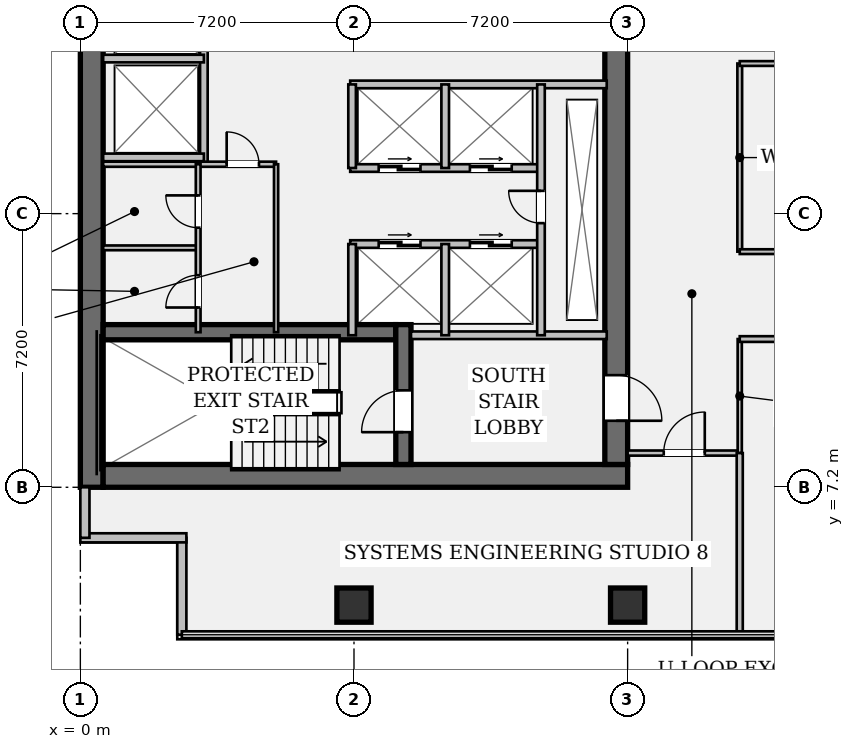
"""IFC4 building model, lengths in metres.
Left out: names, types, materials, properties, quantities, classifications, styles, units other than length and angle.
Written with IfcOpenShell. Run it as: python <this file> out.ifc"""

import sys

from ifc_helpers import new_model, si_unit, direction, frame, frame_2d, origin, origin_2d, place, context, subcontext, project, spatial, rectangle, hollow_rectangle, extrude, element, fill, save


model = new_model("IFC4")
c1 = context("Model", 3, precision=1e-05, world=origin(), true_north=direction((0.0, 1.0)))
c2 = subcontext(c1, "Body", "Model", "MODEL_VIEW")
j1 = project(units=[si_unit("LENGTHUNIT", "METRE"), si_unit("PLANEANGLEUNIT", "RADIAN")], contexts=[c1])
p1 = place(None, origin())
s1 = spatial("IfcSite", under=j1, at=p1, CompositionType="ELEMENT")
p2 = place(p1, origin())
s2 = spatial("IfcBuilding", under=s1, at=p2, CompositionType="ELEMENT")
p3 = place(p2, frame((0.0, 0.0, 133.0)))
s3 = spatial("IfcBuildingStorey", under=s2, at=p3, CompositionType="ELEMENT", Elevation=133.0)
p4 = place(p3, frame((0.3, 7.2, 0.0), z_axis=(0.0, 0.0, 1.0), x_axis=(0.0, 1.0, 0.0)))
e1 = element("IfcWall", 1, at=p4, inside=s3, PredefinedType="SHEAR", context=c2, shape_type="SweptSolid", body=[
    extrude(rectangle(XDim=28.8, YDim=0.6, at=frame_2d((14.4, 0.0))), origin(), (0.0, 0.0, 1.0), 3.58),
])
p5 = place(p3, frame((0.6, 7.5, 0.0), z_axis=(0.0, 0.0, 1.0), x_axis=(1.0, 0.0, 0.0)))
e2 = element("IfcWall", 2, at=p5, inside=s3, PredefinedType="SHEAR", context=c2, shape_type="SweptSolid", body=[
    extrude(rectangle(XDim=13.8, YDim=0.6, at=frame_2d((6.9, 0.0))), origin(), (0.0, 0.0, 1.0), 3.58),
])
p6 = place(p3, frame((14.1, 35.4, 0.0), z_axis=(0.0, 0.0, 1.0), x_axis=(0.0, -1.0, 0.0)))
e3 = element("IfcWall", 3, at=p6, inside=s3, PredefinedType="SHEAR", context=c2, shape_type="SweptSolid", body=[
    extrude(rectangle(XDim=27.6, YDim=0.6, at=frame_2d((13.8, 0.0))), origin(), (0.0, 0.0, 1.0), 3.58),
])
p7 = place(p6, frame((1.3, 0.0, 0.0)))
e4 = element("IfcOpeningElement", 4, at=p7, cuts=e3, PredefinedType="OPENING", context=c2, shape_type="SweptSolid", body=[
    extrude(rectangle(XDim=1.2, YDim=2.15, at=frame_2d((0.6, 1.075))), frame((0.0, 0.312, 0.0), z_axis=(0.0, -1.0, 0.0), x_axis=(1.0, 0.0, 0.0)), (0.0, 0.0, 1.0), 0.624),
])
p8 = place(p6, frame((25.25, 0.0, 0.0)))
e5 = element("IfcOpeningElement", 5, at=p8, cuts=e3, PredefinedType="OPENING", context=c2, shape_type="SweptSolid", body=[
    extrude(rectangle(XDim=1.2, YDim=2.15, at=frame_2d((0.6, 1.075))), frame((0.0, 0.312, 0.0), z_axis=(0.0, -1.0, 0.0), x_axis=(1.0, 0.0, 0.0)), (0.0, 0.0, 1.0), 0.624),
])
p9 = place(p6, frame((14.6, 0.0, 0.0)))
e6 = element("IfcOpeningElement", 6, at=p9, cuts=e3, PredefinedType="OPENING", context=c2, shape_type="SweptSolid", body=[
    extrude(rectangle(XDim=1.6, YDim=2.2, at=frame_2d((0.8, 1.1))), frame((0.0, 0.312, 0.0), z_axis=(0.0, -1.0, 0.0), x_axis=(1.0, 0.0, 0.0)), (0.0, 0.0, 1.0), 0.624),
])
p10 = place(p3, frame((0.6, 11.28, 0.0), z_axis=(0.0, 0.0, 1.0), x_axis=(1.0, 0.0, 0.0)))
e7 = element("IfcWall", 7, at=p10, inside=s3, PredefinedType="SHEAR", context=c2, shape_type="SweptSolid", body=[
    extrude(rectangle(XDim=7.7, YDim=0.4, at=frame_2d((3.85, 0.0))), origin(), (0.0, 0.0, 1.0), 3.58),
])
p11 = place(p3, frame((8.5, 7.8, 0.0), z_axis=(0.0, 0.0, 1.0), x_axis=(0.0, 1.0, 0.0)))
e8 = element("IfcWall", 8, at=p11, inside=s3, PredefinedType="SHEAR", context=c2, shape_type="SweptSolid", body=[
    extrude(rectangle(XDim=3.68, YDim=0.4, at=frame_2d((1.84, 0.0))), origin(), (0.0, 0.0, 1.0), 3.58),
])
p12 = place(p11, frame((0.85, 0.0, 0.0)))
e9 = element("IfcOpeningElement", 9, at=p12, cuts=e8, PredefinedType="OPENING", context=c2, shape_type="SweptSolid", body=[
    extrude(rectangle(XDim=1.1, YDim=2.15, at=frame_2d((0.55, 1.075))), frame((0.0, 0.212, 0.0), z_axis=(0.0, -1.0, 0.0), x_axis=(1.0, 0.0, 0.0)), (0.0, 0.0, 1.0), 0.424),
])
for number, where, z_axis, x_axis in (
    (10, (7.2, 4.1, 0.0), (0.0, 0.0, 1.0), (1.0, 0.0, 0.0)),
    (11, (14.4, 4.1, 0.0), (0.0, 0.0, 1.0), (1.0, 0.0, 0.0)),
):
    element("IfcColumn", number, at=place(p3, frame(where, z_axis=z_axis, x_axis=x_axis)), inside=s3, PredefinedType="COLUMN", context=c2, shape_type="SweptSolid", body=[
        extrude(hollow_rectangle(XDim=0.9, YDim=0.9, WallThickness=0.055, at=origin_2d()), origin(), (0.0, 0.0, 1.0), 3.58),
    ])
p13 = place(p3, frame((2.67, 3.32, 0.0), z_axis=(0.0, 0.0, 1.0), x_axis=(0.0, 1.0, 0.0)))
e12 = element("IfcWall", 12, at=p13, inside=s3, PredefinedType="STANDARD", context=c2, shape_type="SweptSolid", body=[
    extrude(rectangle(XDim=2.55, YDim=0.24, at=frame_2d((1.275, 0.0))), origin(), (0.0, 0.0, 1.0), 3.58),
])
p14 = place(p3, frame((2.79, 5.87, 0.0), z_axis=(0.0, 0.0, 1.0), x_axis=(-1.0, 0.0, 0.0)))
e13 = element("IfcWall", 13, at=p14, inside=s3, PredefinedType="STANDARD", context=c2, shape_type="SweptSolid", body=[
    extrude(rectangle(XDim=2.79, YDim=0.24, at=frame_2d((1.395, 0.0))), origin(), (0.0, 0.0, 1.0), 3.58),
])
p15 = place(p3, frame((0.12, 5.87, 0.0), z_axis=(0.0, 0.0, 1.0), x_axis=(0.0, 1.0, 0.0)))
e14 = element("IfcWall", 14, at=p15, inside=s3, PredefinedType="STANDARD", context=c2, shape_type="SweptSolid", body=[
    extrude(rectangle(XDim=1.33, YDim=0.24, at=frame_2d((0.665, 0.0))), origin(), (0.0, 0.0, 1.0), 3.58),
])
p16 = place(p3, frame((8.7, 11.2, 0.0), z_axis=(0.0, 0.0, 1.0), x_axis=(1.0, 0.0, 0.0)))
e15 = element("IfcWall", 15, at=p16, inside=s3, PredefinedType="PARTITIONING", context=c2, shape_type="SweptSolid", body=[
    extrude(rectangle(XDim=5.15, YDim=0.2, at=frame_2d((2.575, 0.0))), origin(), (0.0, 0.0, 1.0), 3.58),
])
p17 = place(p3, frame((3.25, 15.7, 0.0), z_axis=(0.0, 0.0, 1.0), x_axis=(0.0, 1.0, 0.0)))
e16 = element("IfcWall", 16, at=p17, inside=s3, PredefinedType="PARTITIONING", context=c2, shape_type="SweptSolid", body=[
    extrude(rectangle(XDim=13.08, YDim=0.2, at=frame_2d((6.54, 0.0))), origin(), (0.0, 0.0, 1.0), 3.58),
])
for number, where, z_axis, x_axis in (
    (17, (0.6, 15.88, 0.0), (0.0, 0.0, 1.0), (1.0, 0.0, 0.0)),
    (18, (0.6, 18.48, 0.0), (0.0, 0.0, 1.0), (1.0, 0.0, 0.0)),
):
    element("IfcWall", number, at=place(p3, frame(where, z_axis=z_axis, x_axis=x_axis)), inside=s3, PredefinedType="PARTITIONING", context=c2, shape_type="SweptSolid", body=[
        extrude(rectangle(XDim=2.65, YDim=0.2, at=frame_2d((1.325, 0.0))), origin(), (0.0, 0.0, 1.0), 3.58),
    ])
p18 = place(p3, frame((7.1, 17.8, 0.0), z_axis=(0.0, 0.0, 1.0), x_axis=(1.0, 0.0, 0.0)))
e19 = element("IfcWall", 19, at=p18, inside=s3, PredefinedType="PARTITIONING", context=c2, shape_type="SweptSolid", body=[
    extrude(rectangle(XDim=6.75, YDim=0.2, at=frame_2d((3.375, 0.0))), origin(), (0.0, 0.0, 1.0), 3.58),
])
p19 = place(p3, frame((7.1, 15.6, 0.0), z_axis=(0.0, 0.0, 1.0), x_axis=(1.0, 0.0, 0.0)))
e20 = element("IfcWall", 20, at=p19, inside=s3, PredefinedType="PARTITIONING", context=c2, shape_type="SweptSolid", body=[
    extrude(rectangle(XDim=5.02, YDim=0.2, at=frame_2d((2.51, 0.0))), origin(), (0.0, 0.0, 1.0), 3.58),
])
p20 = place(p19, frame((0.75, 0.0, 0.0)))
e21 = element("IfcOpeningElement", 21, at=p20, cuts=e20, PredefinedType="OPENING", context=c2, shape_type="SweptSolid", body=[
    extrude(rectangle(XDim=1.1, YDim=2.2, at=frame_2d((0.55, 1.1))), frame((0.0, 0.112, 0.0), z_axis=(0.0, -1.0, 0.0), x_axis=(1.0, 0.0, 0.0)), (0.0, 0.0, 1.0), 0.224),
])
p21 = place(p19, frame((3.15, 0.0, 0.0)))
e22 = element("IfcOpeningElement", 22, at=p21, cuts=e20, PredefinedType="OPENING", context=c2, shape_type="SweptSolid", body=[
    extrude(rectangle(XDim=1.1, YDim=2.2, at=frame_2d((0.55, 1.1))), frame((0.0, 0.112, 0.0), z_axis=(0.0, -1.0, 0.0), x_axis=(1.0, 0.0, 0.0)), (0.0, 0.0, 1.0), 0.224),
])
p22 = place(p3, frame((7.1, 13.6, 0.0), z_axis=(0.0, 0.0, 1.0), x_axis=(1.0, 0.0, 0.0)))
e23 = element("IfcWall", 23, at=p22, inside=s3, PredefinedType="PARTITIONING", context=c2, shape_type="SweptSolid", body=[
    extrude(rectangle(XDim=5.02, YDim=0.2, at=frame_2d((2.51, 0.0))), origin(), (0.0, 0.0, 1.0), 3.58),
])
p23 = place(p22, frame((0.75, 0.0, 0.0)))
e24 = element("IfcOpeningElement", 24, at=p23, cuts=e23, PredefinedType="OPENING", context=c2, shape_type="SweptSolid", body=[
    extrude(rectangle(XDim=1.1, YDim=2.2, at=frame_2d((0.55, 1.1))), frame((0.0, 0.112, 0.0), z_axis=(0.0, -1.0, 0.0), x_axis=(1.0, 0.0, 0.0)), (0.0, 0.0, 1.0), 0.224),
])
p24 = place(p22, frame((3.15, 0.0, 0.0)))
e25 = element("IfcOpeningElement", 25, at=p24, cuts=e23, PredefinedType="OPENING", context=c2, shape_type="SweptSolid", body=[
    extrude(rectangle(XDim=1.1, YDim=2.2, at=frame_2d((0.55, 1.1))), frame((0.0, 0.112, 0.0), z_axis=(0.0, -1.0, 0.0), x_axis=(1.0, 0.0, 0.0)), (0.0, 0.0, 1.0), 0.224),
])
p25 = place(p3, frame((7.15, 15.6, 0.0), z_axis=(0.0, 0.0, 1.0), x_axis=(0.0, 1.0, 0.0)))
e26 = element("IfcWall", 26, at=p25, inside=s3, PredefinedType="PARTITIONING", context=c2, shape_type="SweptSolid", body=[
    extrude(rectangle(XDim=2.2, YDim=0.2, at=frame_2d((1.1, 0.0))), origin(), (0.0, 0.0, 1.0), 3.58),
])
p26 = place(p3, frame((7.15, 11.2, 0.0), z_axis=(0.0, 0.0, 1.0), x_axis=(0.0, 1.0, 0.0)))
e27 = element("IfcWall", 27, at=p26, inside=s3, PredefinedType="PARTITIONING", context=c2, shape_type="SweptSolid", body=[
    extrude(rectangle(XDim=2.4, YDim=0.2, at=frame_2d((1.2, 0.0))), origin(), (0.0, 0.0, 1.0), 3.58),
])
p27 = place(p3, frame((9.6, 15.6, 0.0), z_axis=(0.0, 0.0, 1.0), x_axis=(0.0, 1.0, 0.0)))
e28 = element("IfcWall", 28, at=p27, inside=s3, PredefinedType="PARTITIONING", context=c2, shape_type="SweptSolid", body=[
    extrude(rectangle(XDim=2.2, YDim=0.2, at=frame_2d((1.1, 0.0))), origin(), (0.0, 0.0, 1.0), 3.58),
])
p28 = place(p3, frame((9.6, 11.2, 0.0), z_axis=(0.0, 0.0, 1.0), x_axis=(0.0, 1.0, 0.0)))
e29 = element("IfcWall", 29, at=p28, inside=s3, PredefinedType="PARTITIONING", context=c2, shape_type="SweptSolid", body=[
    extrude(rectangle(XDim=2.4, YDim=0.2, at=frame_2d((1.2, 0.0))), origin(), (0.0, 0.0, 1.0), 3.58),
])
p29 = place(p3, frame((12.12, 11.2, 0.0), z_axis=(0.0, 0.0, 1.0), x_axis=(0.0, 1.0, 0.0)))
e30 = element("IfcWall", 30, at=p29, inside=s3, PredefinedType="PARTITIONING", context=c2, shape_type="SweptSolid", body=[
    extrude(rectangle(XDim=6.6, YDim=0.2, at=frame_2d((3.3, 0.0))), origin(), (0.0, 0.0, 1.0), 3.58),
])
p30 = place(p29, frame((2.95, 0.0, 0.0)))
e31 = element("IfcOpeningElement", 31, at=p30, cuts=e30, PredefinedType="OPENING", context=c2, shape_type="SweptSolid", body=[
    extrude(rectangle(XDim=0.85, YDim=2.15, at=frame_2d((0.425, 1.075))), frame((0.0, 0.112, 0.0), z_axis=(0.0, -1.0, 0.0), x_axis=(1.0, 0.0, 0.0)), (0.0, 0.0, 1.0), 0.224),
])
p31 = place(p3, frame((0.6, 15.7, 0.0), z_axis=(0.0, 0.0, 1.0), x_axis=(1.0, 0.0, 0.0)))
e32 = element("IfcWall", 32, at=p31, inside=s3, PredefinedType="PARTITIONING", context=c2, shape_type="SweptSolid", body=[
    extrude(rectangle(XDim=4.55, YDim=0.135, at=frame_2d((2.275, 0.0))), origin(), (0.0, 0.0, 1.0), 3.58),
])
p32 = place(p31, frame((3.25, 0.0, 0.0)))
e33 = element("IfcOpeningElement", 33, at=p32, cuts=e32, PredefinedType="OPENING", context=c2, shape_type="SweptSolid", body=[
    extrude(rectangle(XDim=0.85, YDim=2.15, at=frame_2d((0.425, 1.075))), frame((0.0, 0.08, 0.0), z_axis=(0.0, -1.0, 0.0), x_axis=(1.0, 0.0, 0.0)), (0.0, 0.0, 1.0), 0.159),
])
p33 = place(p3, frame((5.15, 11.28, 0.0), z_axis=(0.0, 0.0, 1.0), x_axis=(0.0, 1.0, 0.0)))
e34 = element("IfcWall", 34, at=p33, inside=s3, PredefinedType="PARTITIONING", context=c2, shape_type="SweptSolid", body=[
    extrude(rectangle(XDim=4.42, YDim=0.11, at=frame_2d((2.21, 0.0))), origin(), (0.0, 0.0, 1.0), 3.58),
])
p34 = place(p3, frame((0.6, 13.5, 0.0), z_axis=(0.0, 0.0, 1.0), x_axis=(1.0, 0.0, 0.0)))
e35 = element("IfcWall", 35, at=p34, inside=s3, PredefinedType="PARTITIONING", context=c2, shape_type="SweptSolid", body=[
    extrude(rectangle(XDim=2.5, YDim=0.125, at=frame_2d((1.25, 0.0))), origin(), (0.0, 0.0, 1.0), 3.58),
])
p35 = place(p3, frame((3.1, 11.28, 0.0), z_axis=(0.0, 0.0, 1.0), x_axis=(0.0, 1.0, 0.0)))
e36 = element("IfcWall", 36, at=p35, inside=s3, PredefinedType="PARTITIONING", context=c2, shape_type="SweptSolid", body=[
    extrude(rectangle(XDim=4.42, YDim=0.125, at=frame_2d((2.21, 0.0))), origin(), (0.0, 0.0, 1.0), 3.58),
])
p36 = place(p35, frame((0.65, 0.0, 0.0)))
e37 = element("IfcOpeningElement", 37, at=p36, cuts=e36, PredefinedType="OPENING", context=c2, shape_type="SweptSolid", body=[
    extrude(rectangle(XDim=0.85, YDim=2.15, at=frame_2d((0.425, 1.075))), frame((0.0, 0.074, 0.0), z_axis=(0.0, -1.0, 0.0), x_axis=(1.0, 0.0, 0.0)), (0.0, 0.0, 1.0), 0.149),
])
p37 = place(p35, frame((2.75, 0.0, 0.0)))
e38 = element("IfcOpeningElement", 38, at=p37, cuts=e36, PredefinedType="OPENING", context=c2, shape_type="SweptSolid", body=[
    extrude(rectangle(XDim=0.85, YDim=2.15, at=frame_2d((0.425, 1.075))), frame((0.0, 0.074, 0.0), z_axis=(0.0, -1.0, 0.0), x_axis=(1.0, 0.0, 0.0)), (0.0, 0.0, 1.0), 0.149),
])
p38 = place(p3, frame((14.4, 8.1, 0.0), z_axis=(0.0, 0.0, 1.0), x_axis=(1.0, 0.0, 0.0)))
e39 = element("IfcWall", 39, at=p38, inside=s3, PredefinedType="PARTITIONING", context=c2, shape_type="SweptSolid", body=[
    extrude(rectangle(XDim=2.95, YDim=0.135, at=frame_2d((1.475, 0.0))), origin(), (0.0, 0.0, 1.0), 3.148),
])
p39 = place(p38, frame((0.95, 0.0, 0.0)))
e40 = element("IfcOpeningElement", 40, at=p39, cuts=e39, PredefinedType="OPENING", context=c2, shape_type="SweptSolid", body=[
    extrude(rectangle(XDim=1.08, YDim=2.15, at=frame_2d((0.54, 1.075))), frame((0.0, 0.08, 0.0), z_axis=(0.0, -1.0, 0.0), x_axis=(1.0, 0.0, 0.0)), (0.0, 0.0, 1.0), 0.159),
])
p40 = place(p3, frame((17.35, 8.1, 0.0), z_axis=(0.0, 0.0, 1.0), x_axis=(0.0, 1.0, 0.0)))
e41 = element("IfcWall", 41, at=p40, inside=s3, PredefinedType="PARTITIONING", context=c2, shape_type="SweptSolid", body=[
    extrude(rectangle(XDim=3.0, YDim=0.11, at=frame_2d((1.5, 0.0))), origin(), (0.0, 0.0, 1.0), 3.58),
])
p41 = place(p3, frame((17.35, 11.1, 0.0), z_axis=(0.0, 0.0, 1.0), x_axis=(1.0, 0.0, 0.0)))
e42 = element("IfcWall", 42, at=p41, inside=s3, PredefinedType="PARTITIONING", context=c2, shape_type="SweptSolid", body=[
    extrude(rectangle(XDim=19.95, YDim=0.15, at=frame_2d((9.975, 0.0))), origin(), (0.0, 0.0, 1.0), 2.869),
])
p42 = place(p41, frame((2.52, 0.0, 0.0)))
e43 = element("IfcOpeningElement", 43, at=p42, cuts=e42, PredefinedType="OPENING", context=c2, shape_type="SweptSolid", body=[
    extrude(rectangle(XDim=1.08, YDim=2.15, at=frame_2d((0.54, 1.075))), frame((0.0, 0.087, 0.0), z_axis=(0.0, -1.0, 0.0), x_axis=(1.0, 0.0, 0.0)), (0.0, 0.0, 1.0), 0.174),
])
p43 = place(p41, frame((9.15, 0.0, 0.0)))
e44 = element("IfcOpeningElement", 44, at=p43, cuts=e42, PredefinedType="OPENING", context=c2, shape_type="SweptSolid", body=[
    extrude(rectangle(XDim=1.08, YDim=2.15, at=frame_2d((0.54, 1.075))), frame((0.0, 0.087, 0.0), z_axis=(0.0, -1.0, 0.0), x_axis=(1.0, 0.0, 0.0)), (0.0, 0.0, 1.0), 0.174),
])
p44 = place(p41, frame((16.1, 0.0, 0.0)))
e45 = element("IfcOpeningElement", 45, at=p44, cuts=e42, PredefinedType="OPENING", context=c2, shape_type="SweptSolid", body=[
    extrude(rectangle(XDim=1.08, YDim=2.15, at=frame_2d((0.54, 1.075))), frame((0.0, 0.087, 0.0), z_axis=(0.0, -1.0, 0.0), x_axis=(1.0, 0.0, 0.0)), (0.0, 0.0, 1.0), 0.174),
])
p45 = place(p3, frame((17.35, 13.4, 0.0), z_axis=(0.0, 0.0, 1.0), x_axis=(0.0, 1.0, 0.0)))
e46 = element("IfcWall", 46, at=p45, inside=s3, PredefinedType="PARTITIONING", context=c2, shape_type="SweptSolid", body=[
    extrude(rectangle(XDim=4.95, YDim=0.125, at=frame_2d((2.475, 0.0))), origin(), (0.0, 0.0, 1.0), 2.869),
])
p46 = place(p3, frame((17.35, 13.4, 0.0), z_axis=(0.0, 0.0, 1.0), x_axis=(1.0, 0.0, 0.0)))
e47 = element("IfcWall", 47, at=p46, inside=s3, PredefinedType="PARTITIONING", context=c2, shape_type="SweptSolid", body=[
    extrude(rectangle(XDim=17.6, YDim=0.125, at=frame_2d((8.8, 0.0))), origin(), (0.0, 0.0, 1.0), 2.869),
])
p47 = place(p3, frame((17.35, 18.35, 0.0), z_axis=(0.0, 0.0, 1.0), x_axis=(1.0, 0.0, 0.0)))
e48 = element("IfcWall", 48, at=p47, inside=s3, PredefinedType="PARTITIONING", context=c2, shape_type="SweptSolid", body=[
    extrude(rectangle(XDim=17.6, YDim=0.125, at=frame_2d((8.8, 0.0))), origin(), (0.0, 0.0, 1.0), 2.869),
])
p48 = place(p47, frame((8.3, 0.0, 0.0)))
e49 = element("IfcOpeningElement", 49, at=p48, cuts=e48, PredefinedType="OPENING", context=c2, shape_type="SweptSolid", body=[
    extrude(rectangle(XDim=1.08, YDim=2.15, at=frame_2d((0.54, 1.075))), frame((0.0, 0.074, 0.0), z_axis=(0.0, -1.0, 0.0), x_axis=(1.0, 0.0, 0.0)), (0.0, 0.0, 1.0), 0.149),
])
p49 = place(p3, frame((17.35, 3.32, 0.0), z_axis=(0.0, 0.0, 1.0), x_axis=(0.0, 1.0, 0.0)))
e50 = element("IfcWall", 50, at=p49, inside=s3, PredefinedType="PARTITIONING", context=c2, shape_type="SweptSolid", body=[
    extrude(rectangle(XDim=4.78, YDim=0.16, at=frame_2d((2.39, 0.0))), origin(), (0.0, 0.0, 1.0), 2.869),
])
p50 = place(p12, origin())
e51 = element("IfcDoor", 51, at=p50, inside=s3, OperationType="SINGLE_SWING_LEFT", PredefinedType="DOOR", context=c2, shape_type="SweptSolid", body=[
    extrude(rectangle(XDim=1.1, YDim=2.15, at=frame_2d((0.55, 1.075))), frame((0.0, 0.025, 0.0), z_axis=(0.0, -1.0, 0.0), x_axis=(1.0, 0.0, 0.0)), (0.0, 0.0, 1.0), 0.05),
])
fill(e9, e51)
p51 = place(p8, origin())
e52 = element("IfcDoor", 52, at=p51, inside=s3, OperationType="SINGLE_SWING_RIGHT", PredefinedType="DOOR", context=c2, shape_type="SweptSolid", body=[
    extrude(rectangle(XDim=1.2, YDim=2.15, at=frame_2d((0.6, 1.075))), frame((0.0, 0.025, 0.0), z_axis=(0.0, -1.0, 0.0), x_axis=(1.0, 0.0, 0.0)), (0.0, 0.0, 1.0), 0.05),
])
fill(e5, e52)
p52 = place(p30, origin())
e53 = element("IfcDoor", 53, at=p52, inside=s3, OperationType="SINGLE_SWING_RIGHT", PredefinedType="DOOR", context=c2, shape_type="SweptSolid", body=[
    extrude(rectangle(XDim=0.85, YDim=2.15, at=frame_2d((0.425, 1.075))), frame((0.0, 0.025, 0.0), z_axis=(0.0, -1.0, 0.0), x_axis=(1.0, 0.0, 0.0)), (0.0, 0.0, 1.0), 0.05),
])
fill(e31, e53)
p53 = place(p20, origin())
e54 = element("IfcDoor", 54, at=p53, inside=s3, OperationType="DOUBLE_DOOR_SLIDING", PredefinedType="DOOR", context=c2, shape_type="SweptSolid", body=[
    extrude(rectangle(XDim=1.1, YDim=2.2, at=frame_2d((0.55, 1.1))), frame((0.0, 0.025, 0.0), z_axis=(0.0, -1.0, 0.0), x_axis=(1.0, 0.0, 0.0)), (0.0, 0.0, 1.0), 0.05),
])
fill(e21, e54)
p54 = place(p21, origin())
e55 = element("IfcDoor", 55, at=p54, inside=s3, OperationType="DOUBLE_DOOR_SLIDING", PredefinedType="DOOR", context=c2, shape_type="SweptSolid", body=[
    extrude(rectangle(XDim=1.1, YDim=2.2, at=frame_2d((0.55, 1.1))), frame((0.0, 0.025, 0.0), z_axis=(0.0, -1.0, 0.0), x_axis=(1.0, 0.0, 0.0)), (0.0, 0.0, 1.0), 0.05),
])
fill(e22, e55)
p55 = place(p23, origin())
e56 = element("IfcDoor", 56, at=p55, inside=s3, OperationType="DOUBLE_DOOR_SLIDING", PredefinedType="DOOR", context=c2, shape_type="SweptSolid", body=[
    extrude(rectangle(XDim=1.1, YDim=2.2, at=frame_2d((0.55, 1.1))), frame((0.0, 0.025, 0.0), z_axis=(0.0, -1.0, 0.0), x_axis=(1.0, 0.0, 0.0)), (0.0, 0.0, 1.0), 0.05),
])
fill(e24, e56)
p56 = place(p24, origin())
e57 = element("IfcDoor", 57, at=p56, inside=s3, OperationType="DOUBLE_DOOR_SLIDING", PredefinedType="DOOR", context=c2, shape_type="SweptSolid", body=[
    extrude(rectangle(XDim=1.1, YDim=2.2, at=frame_2d((0.55, 1.1))), frame((0.0, 0.025, 0.0), z_axis=(0.0, -1.0, 0.0), x_axis=(1.0, 0.0, 0.0)), (0.0, 0.0, 1.0), 0.05),
])
fill(e25, e57)
p57 = place(p32, origin())
e58 = element("IfcDoor", 58, at=p57, inside=s3, OperationType="SINGLE_SWING_LEFT", PredefinedType="DOOR", context=c2, shape_type="SweptSolid", body=[
    extrude(rectangle(XDim=0.85, YDim=2.15, at=frame_2d((0.425, 1.075))), frame((0.0, 0.025, 0.0), z_axis=(0.0, -1.0, 0.0), x_axis=(1.0, 0.0, 0.0)), (0.0, 0.0, 1.0), 0.05),
])
fill(e33, e58)
p58 = place(p36, origin())
e59 = element("IfcDoor", 59, at=p58, inside=s3, OperationType="SINGLE_SWING_LEFT", PredefinedType="DOOR", context=c2, shape_type="SweptSolid", body=[
    extrude(rectangle(XDim=0.85, YDim=2.15, at=frame_2d((0.425, 1.075))), frame((0.0, 0.025, 0.0), z_axis=(0.0, -1.0, 0.0), x_axis=(1.0, 0.0, 0.0)), (0.0, 0.0, 1.0), 0.05),
])
fill(e37, e59)
p59 = place(p37, origin())
e60 = element("IfcDoor", 60, at=p59, inside=s3, OperationType="SINGLE_SWING_RIGHT", PredefinedType="DOOR", context=c2, shape_type="SweptSolid", body=[
    extrude(rectangle(XDim=0.85, YDim=2.15, at=frame_2d((0.425, 1.075))), frame((0.0, 0.025, 0.0), z_axis=(0.0, -1.0, 0.0), x_axis=(1.0, 0.0, 0.0)), (0.0, 0.0, 1.0), 0.05),
])
fill(e38, e60)
p60 = place(p39, origin())
e61 = element("IfcDoor", 61, at=p60, inside=s3, OperationType="SINGLE_SWING_RIGHT", PredefinedType="DOOR", context=c2, shape_type="SweptSolid", body=[
    extrude(rectangle(XDim=1.08, YDim=2.15, at=frame_2d((0.54, 1.075))), frame((0.0, 0.025, 0.0), z_axis=(0.0, -1.0, 0.0), x_axis=(1.0, 0.0, 0.0)), (0.0, 0.0, 1.0), 0.05),
])
fill(e40, e61)
save(model, sys.argv[1])
